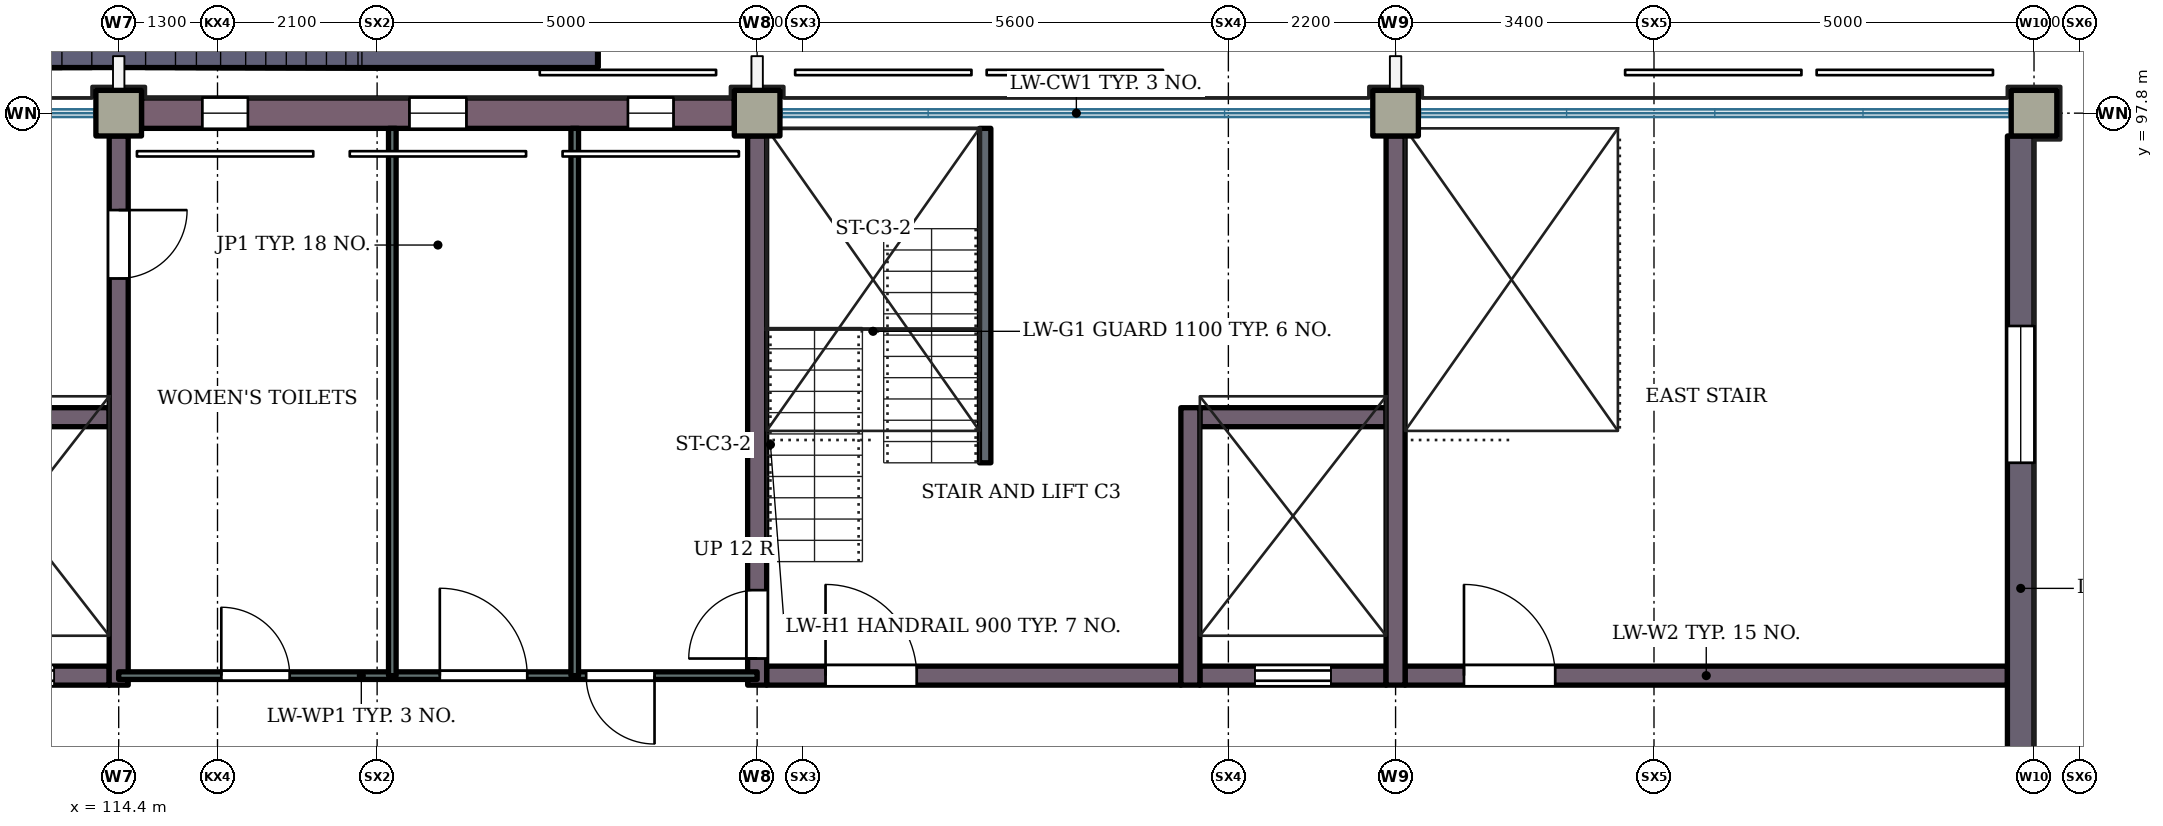
"""IFC4 building model, lengths in metres.
Left out: names, types, materials, properties, quantities, classifications, styles, units other than length and angle.
Written with IfcOpenShell. Run it as: python <this file> out.ifc"""

import sys

from ifc_helpers import new_model, si_unit, direction, frame, frame_2d, origin, origin_2d, place, context, subcontext, project, spatial, rectangle, extrude, element, fill, save


model = new_model("IFC4")
c1 = context("Model", 3, precision=1e-05, world=origin(), true_north=direction((0.0, 1.0)))
c2 = subcontext(c1, "Body", "Model", "MODEL_VIEW")
j1 = project(units=[si_unit("LENGTHUNIT", "METRE"), si_unit("PLANEANGLEUNIT", "RADIAN")], contexts=[c1])
p1 = place(None, origin())
s1 = spatial("IfcSite", under=j1, at=p1, CompositionType="ELEMENT")
p2 = place(p1, origin())
s2 = spatial("IfcBuilding", under=s1, at=p2, CompositionType="ELEMENT")
p3 = place(p2, frame((0.0, 0.0, 8.4)))
s3 = spatial("IfcBuildingStorey", under=s2, at=p3, CompositionType="ELEMENT", Elevation=8.4)
for number, where, z_axis, x_axis in (
    (1, (114.4, 97.8, 0.0), (0.0, 0.0, 1.0), (1.0, 0.0, 0.0)),
    (2, (122.8, 97.8, 0.0), (0.0, 0.0, 1.0), (1.0, 0.0, 0.0)),
    (3, (131.2, 97.8, 0.0), (0.0, 0.0, 1.0), (1.0, 0.0, 0.0)),
    (4, (139.6, 97.8, 0.0), (0.0, 0.0, 1.0), (1.0, 0.0, 0.0)),
):
    element("IfcColumn", number, at=place(p3, frame(where, z_axis=z_axis, x_axis=x_axis)), inside=s3, PredefinedType="COLUMN", context=c2, shape_type="SweptSolid", body=[
        extrude(rectangle(XDim=0.6, YDim=0.6, at=origin_2d()), origin(), (0.0, 0.0, 1.0), 4.2),
    ])
p4 = place(p3, frame((111.825, 90.4, 0.0), z_axis=(0.0, 0.0, 1.0), x_axis=(1.0, 0.0, 0.0)))
e5 = element("IfcWall", 5, at=p4, inside=s3, PredefinedType="SHEAR", context=c2, shape_type="SweptSolid", body=[
    extrude(rectangle(XDim=2.45, YDim=0.25, at=frame_2d((1.225, 0.0))), origin(), (0.0, 0.0, 1.0), 4.2),
])
p5 = place(p4, frame((0.725, 0.0, 0.0)))
e6 = element("IfcOpeningElement", 6, at=p5, cuts=e5, PredefinedType="OPENING", context=c2, shape_type="SweptSolid", body=[
    extrude(rectangle(XDim=1.0, YDim=2.1, at=frame_2d((0.5, 1.05))), frame((0.0, 0.135, 0.0), z_axis=(0.0, -1.0, 0.0), x_axis=(1.0, 0.0, 0.0)), (0.0, 0.0, 1.0), 0.27),
])
p6 = place(p3, frame((122.925, 90.4, 0.0), z_axis=(0.0, 0.0, 1.0), x_axis=(1.0, 0.0, 0.0)))
e7 = element("IfcWall", 7, at=p6, inside=s3, PredefinedType="SHEAR", context=c2, shape_type="SweptSolid", body=[
    extrude(rectangle(XDim=5.45, YDim=0.25, at=frame_2d((2.725, 0.0))), origin(), (0.0, 0.0, 1.0), 4.2),
])
p7 = place(p6, frame((0.775, 0.0, 0.0)))
e8 = element("IfcOpeningElement", 8, at=p7, cuts=e7, PredefinedType="OPENING", context=c2, shape_type="SweptSolid", body=[
    extrude(rectangle(XDim=1.2, YDim=2.1, at=frame_2d((0.6, 1.05))), frame((0.0, 0.135, 0.0), z_axis=(0.0, -1.0, 0.0), x_axis=(1.0, 0.0, 0.0)), (0.0, 0.0, 1.0), 0.27),
])
p8 = place(p3, frame((128.625, 90.4, 0.0), z_axis=(0.0, 0.0, 1.0), x_axis=(1.0, 0.0, 0.0)))
e9 = element("IfcWall", 9, at=p8, inside=s3, PredefinedType="SHEAR", context=c2, shape_type="SweptSolid", body=[
    extrude(rectangle(XDim=2.45, YDim=0.25, at=frame_2d((1.225, 0.0))), origin(), (0.0, 0.0, 1.0), 4.2),
])
p9 = place(p8, frame((0.725, 0.0, 0.0)))
e10 = element("IfcOpeningElement", 10, at=p9, cuts=e9, PredefinedType="OPENING", context=c2, shape_type="SweptSolid", body=[
    extrude(rectangle(XDim=1.0, YDim=2.1, at=frame_2d((0.5, 1.05))), frame((0.0, 0.135, 0.0), z_axis=(0.0, -1.0, 0.0), x_axis=(1.0, 0.0, 0.0)), (0.0, 0.0, 1.0), 0.27),
])
p10 = place(p3, frame((131.325, 90.4, 0.0), z_axis=(0.0, 0.0, 1.0), x_axis=(1.0, 0.0, 0.0)))
e11 = element("IfcWall", 11, at=p10, inside=s3, PredefinedType="SHEAR", context=c2, shape_type="SweptSolid", body=[
    extrude(rectangle(XDim=7.925, YDim=0.25, at=frame_2d((3.962, 0.0))), origin(), (0.0, 0.0, 1.0), 4.2),
])
p11 = place(p10, frame((0.775, 0.0, 0.0)))
e12 = element("IfcOpeningElement", 12, at=p11, cuts=e11, PredefinedType="OPENING", context=c2, shape_type="SweptSolid", body=[
    extrude(rectangle(XDim=1.2, YDim=2.1, at=frame_2d((0.6, 1.05))), frame((0.0, 0.135, 0.0), z_axis=(0.0, -1.0, 0.0), x_axis=(1.0, 0.0, 0.0)), (0.0, 0.0, 1.0), 0.27),
])
for number, where, z_axis, x_axis in (
    (13, (111.825, 93.8, 0.0), (0.0, 0.0, 1.0), (1.0, 0.0, 0.0)),
    (14, (128.625, 93.8, 0.0), (0.0, 0.0, 1.0), (1.0, 0.0, 0.0)),
):
    element("IfcWall", number, at=place(p3, frame(where, z_axis=z_axis, x_axis=x_axis)), inside=s3, PredefinedType="SHEAR", context=c2, shape_type="SweptSolid", body=[
        extrude(rectangle(XDim=2.45, YDim=0.25, at=frame_2d((1.225, 0.0))), origin(), (0.0, 0.0, 1.0), 4.2),
    ])
p12 = place(p3, frame((114.4, 90.275, 0.0), z_axis=(0.0, 0.0, 1.0), x_axis=(0.0, 1.0, 0.0)))
e15 = element("IfcWall", 15, at=p12, inside=s3, PredefinedType="SHEAR", context=c2, shape_type="SweptSolid", body=[
    extrude(rectangle(XDim=7.225, YDim=0.25, at=frame_2d((3.613, 0.0))), origin(), (0.0, 0.0, 1.0), 4.2),
])
p13 = place(p12, frame((5.35, 0.0, 0.0)))
e16 = element("IfcOpeningElement", 16, at=p13, cuts=e15, PredefinedType="OPENING", context=c2, shape_type="SweptSolid", body=[
    extrude(rectangle(XDim=0.9, YDim=2.1, at=frame_2d((0.45, 1.05))), frame((0.0, 0.135, 0.0), z_axis=(0.0, -1.0, 0.0), x_axis=(1.0, 0.0, 0.0)), (0.0, 0.0, 1.0), 0.27),
])
p14 = place(p3, frame((122.8, 90.275, 0.0), z_axis=(0.0, 0.0, 1.0), x_axis=(0.0, 1.0, 0.0)))
e17 = element("IfcWall", 17, at=p14, inside=s3, PredefinedType="SHEAR", context=c2, shape_type="SweptSolid", body=[
    extrude(rectangle(XDim=7.225, YDim=0.25, at=frame_2d((3.613, 0.0))), origin(), (0.0, 0.0, 1.0), 4.2),
])
p15 = place(p14, frame((0.35, 0.0, 0.0)))
e18 = element("IfcOpeningElement", 18, at=p15, cuts=e17, PredefinedType="OPENING", context=c2, shape_type="SweptSolid", body=[
    extrude(rectangle(XDim=0.9, YDim=2.1, at=frame_2d((0.45, 1.05))), frame((0.0, 0.135, 0.0), z_axis=(0.0, -1.0, 0.0), x_axis=(1.0, 0.0, 0.0)), (0.0, 0.0, 1.0), 0.27),
])
p16 = place(p3, frame((128.5, 90.275, 0.0), z_axis=(0.0, 0.0, 1.0), x_axis=(0.0, 1.0, 0.0)))
e19 = element("IfcWall", 19, at=p16, inside=s3, PredefinedType="SHEAR", context=c2, shape_type="SweptSolid", body=[
    extrude(rectangle(XDim=3.65, YDim=0.25, at=frame_2d((1.825, 0.0))), origin(), (0.0, 0.0, 1.0), 4.2),
])
p17 = place(p3, frame((131.2, 90.275, 0.0), z_axis=(0.0, 0.0, 1.0), x_axis=(0.0, 1.0, 0.0)))
e20 = element("IfcWall", 20, at=p17, inside=s3, PredefinedType="SHEAR", context=c2, shape_type="SweptSolid", body=[
    extrude(rectangle(XDim=7.225, YDim=0.25, at=frame_2d((3.613, 0.0))), origin(), (0.0, 0.0, 1.0), 4.2),
])
p18 = place(p3, frame((139.425, 97.5, 0.0), z_axis=(0.0, 0.0, 1.0), x_axis=(0.0, -1.0, 0.0)))
e21 = element("IfcWall", 21, at=p18, inside=s3, PredefinedType="SHEAR", context=c2, shape_type="SweptSolid", body=[
    extrude(rectangle(XDim=9.6, YDim=0.35, at=frame_2d((4.8, 0.0))), origin(), (0.0, 0.0, 1.0), 4.2),
])
p19 = place(p18, frame((2.5, 0.0, 0.9)))
e22 = element("IfcOpeningElement", 22, at=p19, cuts=e21, PredefinedType="OPENING", context=c2, shape_type="SweptSolid", body=[
    extrude(rectangle(XDim=1.8, YDim=2.1, at=frame_2d((0.9, 1.05))), frame((0.0, 0.185, 0.0), z_axis=(0.0, -1.0, 0.0), x_axis=(1.0, 0.0, 0.0)), (0.0, 0.0, 1.0), 0.37),
])
p20 = place(p3, frame((114.7, 97.8, 0.0), z_axis=(0.0, 0.0, 1.0), x_axis=(1.0, 0.0, 0.0)))
e23 = element("IfcWall", 23, at=p20, inside=s3, PredefinedType="SOLIDWALL", context=c2, shape_type="SweptSolid", body=[
    extrude(rectangle(XDim=7.8, YDim=0.4, at=frame_2d((3.9, 0.0))), origin(), (0.0, 0.0, 1.0), 3.32),
])
p21 = place(p20, frame((0.8, 0.0, 2.1)))
e24 = element("IfcOpeningElement", 24, at=p21, cuts=e23, PredefinedType="OPENING", context=c2, shape_type="SweptSolid", body=[
    extrude(rectangle(XDim=0.6, YDim=0.9, at=frame_2d((0.3, 0.45))), frame((0.0, 0.21, 0.0), z_axis=(0.0, -1.0, 0.0), x_axis=(1.0, 0.0, 0.0)), (0.0, 0.0, 1.0), 0.42),
])
p22 = place(p20, frame((3.525, 0.0, 2.1)))
e25 = element("IfcOpeningElement", 25, at=p22, cuts=e23, PredefinedType="OPENING", context=c2, shape_type="SweptSolid", body=[
    extrude(rectangle(XDim=0.75, YDim=0.9, at=frame_2d((0.375, 0.45))), frame((0.0, 0.21, 0.0), z_axis=(0.0, -1.0, 0.0), x_axis=(1.0, 0.0, 0.0)), (0.0, 0.0, 1.0), 0.42),
])
p23 = place(p20, frame((6.4, 0.0, 2.1)))
e26 = element("IfcOpeningElement", 26, at=p23, cuts=e23, PredefinedType="OPENING", context=c2, shape_type="SweptSolid", body=[
    extrude(rectangle(XDim=0.6, YDim=0.9, at=frame_2d((0.3, 0.45))), frame((0.0, 0.21, 0.0), z_axis=(0.0, -1.0, 0.0), x_axis=(1.0, 0.0, 0.0)), (0.0, 0.0, 1.0), 0.42),
])
p24 = place(p3, frame((120.7, 98.9, 0.0), z_axis=(0.0, 0.0, 1.0), x_axis=(-1.0, 0.0, 0.0)))
e27 = element("IfcWall", 27, at=p24, inside=s3, PredefinedType="STANDARD", context=c2, shape_type="SweptSolid", body=[
    extrude(rectangle(XDim=3.1, YDim=1.0, at=frame_2d((1.55, 0.0))), origin(), (0.0, 0.0, 1.0), 0.6),
])
p25 = place(p3, frame((120.7, 98.9, 0.6), z_axis=(0.0, 0.0, 1.0), x_axis=(-1.0, 0.0, 0.0)))
e28 = element("IfcWall", 28, at=p25, inside=s3, PredefinedType="STANDARD", context=c2, shape_type="SweptSolid", body=[
    extrude(rectangle(XDim=3.152, YDim=1.0, at=frame_2d((1.576, 0.0))), origin(), (0.0, 0.0, 1.0), 0.6),
])
p26 = place(p3, frame((120.7, 98.9, 1.2), z_axis=(0.0, 0.0, 1.0), x_axis=(-1.0, 0.0, 0.0)))
e29 = element("IfcWall", 29, at=p26, inside=s3, PredefinedType="STANDARD", context=c2, shape_type="SweptSolid", body=[
    extrude(rectangle(XDim=3.311, YDim=1.0, at=frame_2d((1.656, 0.0))), origin(), (0.0, 0.0, 1.0), 0.55),
])
p27 = place(p3, frame((120.7, 98.9, 1.75), z_axis=(0.0, 0.0, 1.0), x_axis=(-1.0, 0.0, 0.0)))
e30 = element("IfcWall", 30, at=p27, inside=s3, PredefinedType="STANDARD", context=c2, shape_type="SweptSolid", body=[
    extrude(rectangle(XDim=3.567, YDim=1.0, at=frame_2d((1.783, 0.0))), origin(), (0.0, 0.0, 1.0), 0.4),
])
p28 = place(p3, frame((120.7, 98.9, 2.15), z_axis=(0.0, 0.0, 1.0), x_axis=(-1.0, 0.0, 0.0)))
e31 = element("IfcWall", 31, at=p28, inside=s3, PredefinedType="STANDARD", context=c2, shape_type="SweptSolid", body=[
    extrude(rectangle(XDim=3.834, YDim=1.0, at=frame_2d((1.917, 0.0))), origin(), (0.0, 0.0, 1.0), 0.3),
])
p29 = place(p3, frame((120.7, 98.9, 2.45), z_axis=(0.0, 0.0, 1.0), x_axis=(-1.0, 0.0, 0.0)))
e32 = element("IfcWall", 32, at=p29, inside=s3, PredefinedType="STANDARD", context=c2, shape_type="SweptSolid", body=[
    extrude(rectangle(XDim=4.095, YDim=1.0, at=frame_2d((2.047, 0.0))), origin(), (0.0, 0.0, 1.0), 0.25),
])
p30 = place(p3, frame((120.7, 98.9, 2.7), z_axis=(0.0, 0.0, 1.0), x_axis=(-1.0, 0.0, 0.0)))
e33 = element("IfcWall", 33, at=p30, inside=s3, PredefinedType="STANDARD", context=c2, shape_type="SweptSolid", body=[
    extrude(rectangle(XDim=4.365, YDim=1.0, at=frame_2d((2.183, 0.0))), origin(), (0.0, 0.0, 1.0), 0.2),
])
p31 = place(p3, frame((120.7, 98.9, 2.9), z_axis=(0.0, 0.0, 1.0), x_axis=(-1.0, 0.0, 0.0)))
e34 = element("IfcWall", 34, at=p31, inside=s3, PredefinedType="STANDARD", context=c2, shape_type="SweptSolid", body=[
    extrude(rectangle(XDim=4.629, YDim=1.0, at=frame_2d((2.315, 0.0))), origin(), (0.0, 0.0, 1.0), 0.2),
])
p32 = place(p3, frame((120.7, 98.9, 3.1), z_axis=(0.0, 0.0, 1.0), x_axis=(-1.0, 0.0, 0.0)))
e35 = element("IfcWall", 35, at=p32, inside=s3, PredefinedType="STANDARD", context=c2, shape_type="SweptSolid", body=[
    extrude(rectangle(XDim=4.959, YDim=1.0, at=frame_2d((2.479, 0.0))), origin(), (0.0, 0.0, 1.0), 0.15),
])
p33 = place(p3, frame((120.7, 98.9, 3.25), z_axis=(0.0, 0.0, 1.0), x_axis=(-1.0, 0.0, 0.0)))
e36 = element("IfcWall", 36, at=p33, inside=s3, PredefinedType="STANDARD", context=c2, shape_type="SweptSolid", body=[
    extrude(rectangle(XDim=5.278, YDim=1.0, at=frame_2d((2.639, 0.0))), origin(), (0.0, 0.0, 1.0), 0.1),
])
for number, where, z_axis, x_axis in (
    (37, (108.1, 98.9, 3.35), (0.0, 0.0, 1.0), (1.0, 0.0, 0.0)),
    (38, (120.7, 98.9, 3.35), (0.0, 0.0, 1.0), (-1.0, 0.0, 0.0)),
):
    element("IfcWall", number, at=place(p3, frame(where, z_axis=z_axis, x_axis=x_axis)), inside=s3, PredefinedType="STANDARD", context=c2, shape_type="SweptSolid", body=[
        extrude(rectangle(XDim=5.553, YDim=1.0, at=frame_2d((2.776, 0.0))), origin(), (0.0, 0.0, 1.0), 0.1),
    ])
for number, where, z_axis, x_axis in (
    (39, (108.1, 98.9, 3.45), (0.0, 0.0, 1.0), (1.0, 0.0, 0.0)),
    (40, (120.7, 98.9, 3.45), (0.0, 0.0, 1.0), (-1.0, 0.0, 0.0)),
):
    element("IfcWall", number, at=place(p3, frame(where, z_axis=z_axis, x_axis=x_axis)), inside=s3, PredefinedType="STANDARD", context=c2, shape_type="SweptSolid", body=[
        extrude(rectangle(XDim=5.946, YDim=1.0, at=frame_2d((2.973, 0.0))), origin(), (0.0, 0.0, 1.0), 0.05),
    ])
p34 = place(p3, frame((108.1, 98.9, 3.5), z_axis=(0.0, 0.0, 1.0), x_axis=(1.0, 0.0, 0.0)))
e41 = element("IfcWall", 41, at=p34, inside=s3, PredefinedType="STANDARD", context=c2, shape_type="SweptSolid", body=[
    extrude(rectangle(XDim=12.6, YDim=1.0, at=frame_2d((6.3, 0.0))), origin(), (0.0, 0.0, 1.0), 0.7),
])
p35 = place(p3, frame((114.4, 90.4, 0.0), z_axis=(0.0, 0.0, 1.0), x_axis=(1.0, 0.0, 0.0)))
e42 = element("IfcWall", 42, at=p35, inside=s3, PredefinedType="PARTITIONING", context=c2, shape_type="SweptSolid", body=[
    extrude(rectangle(XDim=8.4, YDim=0.1, at=frame_2d((4.2, 0.0))), origin(), (0.0, 0.0, 1.0), 3.92),
])
p36 = place(p35, frame((1.35, 0.0, 0.0)))
e43 = element("IfcOpeningElement", 43, at=p36, cuts=e42, PredefinedType="OPENING", context=c2, shape_type="SweptSolid", body=[
    extrude(rectangle(XDim=0.9, YDim=2.1, at=frame_2d((0.45, 1.05))), frame((0.0, 0.06, 0.0), z_axis=(0.0, -1.0, 0.0), x_axis=(1.0, 0.0, 0.0)), (0.0, 0.0, 1.0), 0.12),
])
p37 = place(p35, frame((4.225, 0.0, 0.0)))
e44 = element("IfcOpeningElement", 44, at=p37, cuts=e42, PredefinedType="OPENING", context=c2, shape_type="SweptSolid", body=[
    extrude(rectangle(XDim=1.15, YDim=2.1, at=frame_2d((0.575, 1.05))), frame((0.0, 0.06, 0.0), z_axis=(0.0, -1.0, 0.0), x_axis=(1.0, 0.0, 0.0)), (0.0, 0.0, 1.0), 0.12),
])
p38 = place(p35, frame((6.15, 0.0, 0.0)))
e45 = element("IfcOpeningElement", 45, at=p38, cuts=e42, PredefinedType="OPENING", context=c2, shape_type="SweptSolid", body=[
    extrude(rectangle(XDim=0.9, YDim=2.1, at=frame_2d((0.45, 1.05))), frame((0.0, 0.06, 0.0), z_axis=(0.0, -1.0, 0.0), x_axis=(1.0, 0.0, 0.0)), (0.0, 0.0, 1.0), 0.12),
])
for number, where, z_axis, x_axis in (
    (46, (118.0, 90.4, 0.0), (0.0, 0.0, 1.0), (0.0, 1.0, 0.0)),
    (47, (120.4, 90.4, 0.0), (0.0, 0.0, 1.0), (0.0, 1.0, 0.0)),
):
    element("IfcWall", number, at=place(p3, frame(where, z_axis=z_axis, x_axis=x_axis)), inside=s3, PredefinedType="PARTITIONING", context=c2, shape_type="SweptSolid", body=[
        extrude(rectangle(XDim=7.2, YDim=0.1, at=frame_2d((3.6, 0.0))), origin(), (0.0, 0.0, 1.0), 3.92),
    ])
p39 = place(p3, frame((125.8, 93.2, 0.0), z_axis=(0.0, 0.0, 1.0), x_axis=(0.0, 1.0, 0.0)))
e48 = element("IfcWall", 48, at=p39, inside=s3, PredefinedType="PARTITIONING", context=c2, shape_type="SweptSolid", body=[
    extrude(rectangle(XDim=4.4, YDim=0.15, at=frame_2d((2.2, 0.0))), origin(), (0.0, 0.0, 1.0), 3.92),
])
p40 = place(p21, origin())
e49 = element("IfcWindow", 49, at=p40, inside=s3, PartitioningType="SINGLE_PANEL", PredefinedType="WINDOW", context=c2, shape_type="SweptSolid", body=[
    extrude(rectangle(XDim=0.6, YDim=0.9, at=frame_2d((0.3, 0.45))), frame((0.0, 0.03, 0.0), z_axis=(0.0, -1.0, 0.0), x_axis=(1.0, 0.0, 0.0)), (0.0, 0.0, 1.0), 0.06),
])
fill(e24, e49)
p41 = place(p22, origin())
e50 = element("IfcWindow", 50, at=p41, inside=s3, PartitioningType="SINGLE_PANEL", PredefinedType="WINDOW", context=c2, shape_type="SweptSolid", body=[
    extrude(rectangle(XDim=0.75, YDim=0.9, at=frame_2d((0.375, 0.45))), frame((0.0, 0.03, 0.0), z_axis=(0.0, -1.0, 0.0), x_axis=(1.0, 0.0, 0.0)), (0.0, 0.0, 1.0), 0.06),
])
fill(e25, e50)
p42 = place(p23, origin())
e51 = element("IfcWindow", 51, at=p42, inside=s3, PartitioningType="SINGLE_PANEL", PredefinedType="WINDOW", context=c2, shape_type="SweptSolid", body=[
    extrude(rectangle(XDim=0.6, YDim=0.9, at=frame_2d((0.3, 0.45))), frame((0.0, 0.03, 0.0), z_axis=(0.0, -1.0, 0.0), x_axis=(1.0, 0.0, 0.0)), (0.0, 0.0, 1.0), 0.06),
])
fill(e26, e51)
p43 = place(p19, origin())
e52 = element("IfcWindow", 52, at=p43, inside=s3, PartitioningType="SINGLE_PANEL", PredefinedType="WINDOW", context=c2, shape_type="SweptSolid", body=[
    extrude(rectangle(XDim=1.8, YDim=2.1, at=frame_2d((0.9, 1.05))), frame((0.0, 0.03, 0.0), z_axis=(0.0, -1.0, 0.0), x_axis=(1.0, 0.0, 0.0)), (0.0, 0.0, 1.0), 0.06),
])
fill(e22, e52)
p44 = place(p36, origin())
e53 = element("IfcDoor", 53, at=p44, inside=s3, OperationType="SINGLE_SWING_LEFT", PredefinedType="DOOR", context=c2, shape_type="SweptSolid", body=[
    extrude(rectangle(XDim=0.9, YDim=2.1, at=frame_2d((0.45, 1.05))), frame((0.0, 0.025, 0.0), z_axis=(0.0, -1.0, 0.0), x_axis=(1.0, 0.0, 0.0)), (0.0, 0.0, 1.0), 0.05),
])
fill(e43, e53)
p45 = place(p13, origin())
e54 = element("IfcDoor", 54, at=p45, inside=s3, OperationType="SINGLE_SWING_RIGHT", PredefinedType="DOOR", context=c2, shape_type="SweptSolid", body=[
    extrude(rectangle(XDim=0.9, YDim=2.1, at=frame_2d((0.45, 1.05))), frame((0.0, 0.025, 0.0), z_axis=(0.0, -1.0, 0.0), x_axis=(1.0, 0.0, 0.0)), (0.0, 0.0, 1.0), 0.05),
])
fill(e16, e54)
p46 = place(p37, origin())
e55 = element("IfcDoor", 55, at=p46, inside=s3, OperationType="SINGLE_SWING_LEFT", PredefinedType="DOOR", context=c2, shape_type="SweptSolid", body=[
    extrude(rectangle(XDim=1.15, YDim=2.1, at=frame_2d((0.575, 1.05))), frame((0.0, 0.025, 0.0), z_axis=(0.0, -1.0, 0.0), x_axis=(1.0, 0.0, 0.0)), (0.0, 0.0, 1.0), 0.05),
])
fill(e44, e55)
p47 = place(p38, origin())
e56 = element("IfcDoor", 56, at=p47, inside=s3, OperationType="SINGLE_SWING_RIGHT", PredefinedType="DOOR", context=c2, shape_type="SweptSolid", body=[
    extrude(rectangle(XDim=0.9, YDim=2.1, at=frame_2d((0.45, 1.05))), frame((0.0, 0.025, 0.0), z_axis=(0.0, -1.0, 0.0), x_axis=(1.0, 0.0, 0.0)), (0.0, 0.0, 1.0), 0.05),
])
fill(e45, e56)
p48 = place(p15, origin())
e57 = element("IfcDoor", 57, at=p48, inside=s3, OperationType="SINGLE_SWING_LEFT", PredefinedType="DOOR", context=c2, shape_type="SweptSolid", body=[
    extrude(rectangle(XDim=0.9, YDim=2.1, at=frame_2d((0.45, 1.05))), frame((0.0, 0.025, 0.0), z_axis=(0.0, -1.0, 0.0), x_axis=(1.0, 0.0, 0.0)), (0.0, 0.0, 1.0), 0.05),
])
fill(e18, e57)
p49 = place(p5, origin())
e58 = element("IfcDoor", 58, at=p49, inside=s3, OperationType="SLIDING_TO_LEFT", PredefinedType="DOOR", context=c2, shape_type="SweptSolid", body=[
    extrude(rectangle(XDim=1.0, YDim=2.1, at=frame_2d((0.5, 1.05))), frame((0.0, 0.025, 0.0), z_axis=(0.0, -1.0, 0.0), x_axis=(1.0, 0.0, 0.0)), (0.0, 0.0, 1.0), 0.05),
])
fill(e6, e58)
p50 = place(p7, origin())
e59 = element("IfcDoor", 59, at=p50, inside=s3, OperationType="SINGLE_SWING_LEFT", PredefinedType="DOOR", context=c2, shape_type="SweptSolid", body=[
    extrude(rectangle(XDim=1.2, YDim=2.1, at=frame_2d((0.6, 1.05))), frame((0.0, 0.025, 0.0), z_axis=(0.0, -1.0, 0.0), x_axis=(1.0, 0.0, 0.0)), (0.0, 0.0, 1.0), 0.05),
])
fill(e8, e59)
p51 = place(p9, origin())
e60 = element("IfcDoor", 60, at=p51, inside=s3, OperationType="SLIDING_TO_LEFT", PredefinedType="DOOR", context=c2, shape_type="SweptSolid", body=[
    extrude(rectangle(XDim=1.0, YDim=2.1, at=frame_2d((0.5, 1.05))), frame((0.0, 0.025, 0.0), z_axis=(0.0, -1.0, 0.0), x_axis=(1.0, 0.0, 0.0)), (0.0, 0.0, 1.0), 0.05),
])
fill(e10, e60)
p52 = place(p11, origin())
e61 = element("IfcDoor", 61, at=p52, inside=s3, OperationType="SINGLE_SWING_LEFT", PredefinedType="DOOR", context=c2, shape_type="SweptSolid", body=[
    extrude(rectangle(XDim=1.2, YDim=2.1, at=frame_2d((0.6, 1.05))), frame((0.0, 0.025, 0.0), z_axis=(0.0, -1.0, 0.0), x_axis=(1.0, 0.0, 0.0)), (0.0, 0.0, 1.0), 0.05),
])
fill(e12, e61)
save(model, sys.argv[1])
